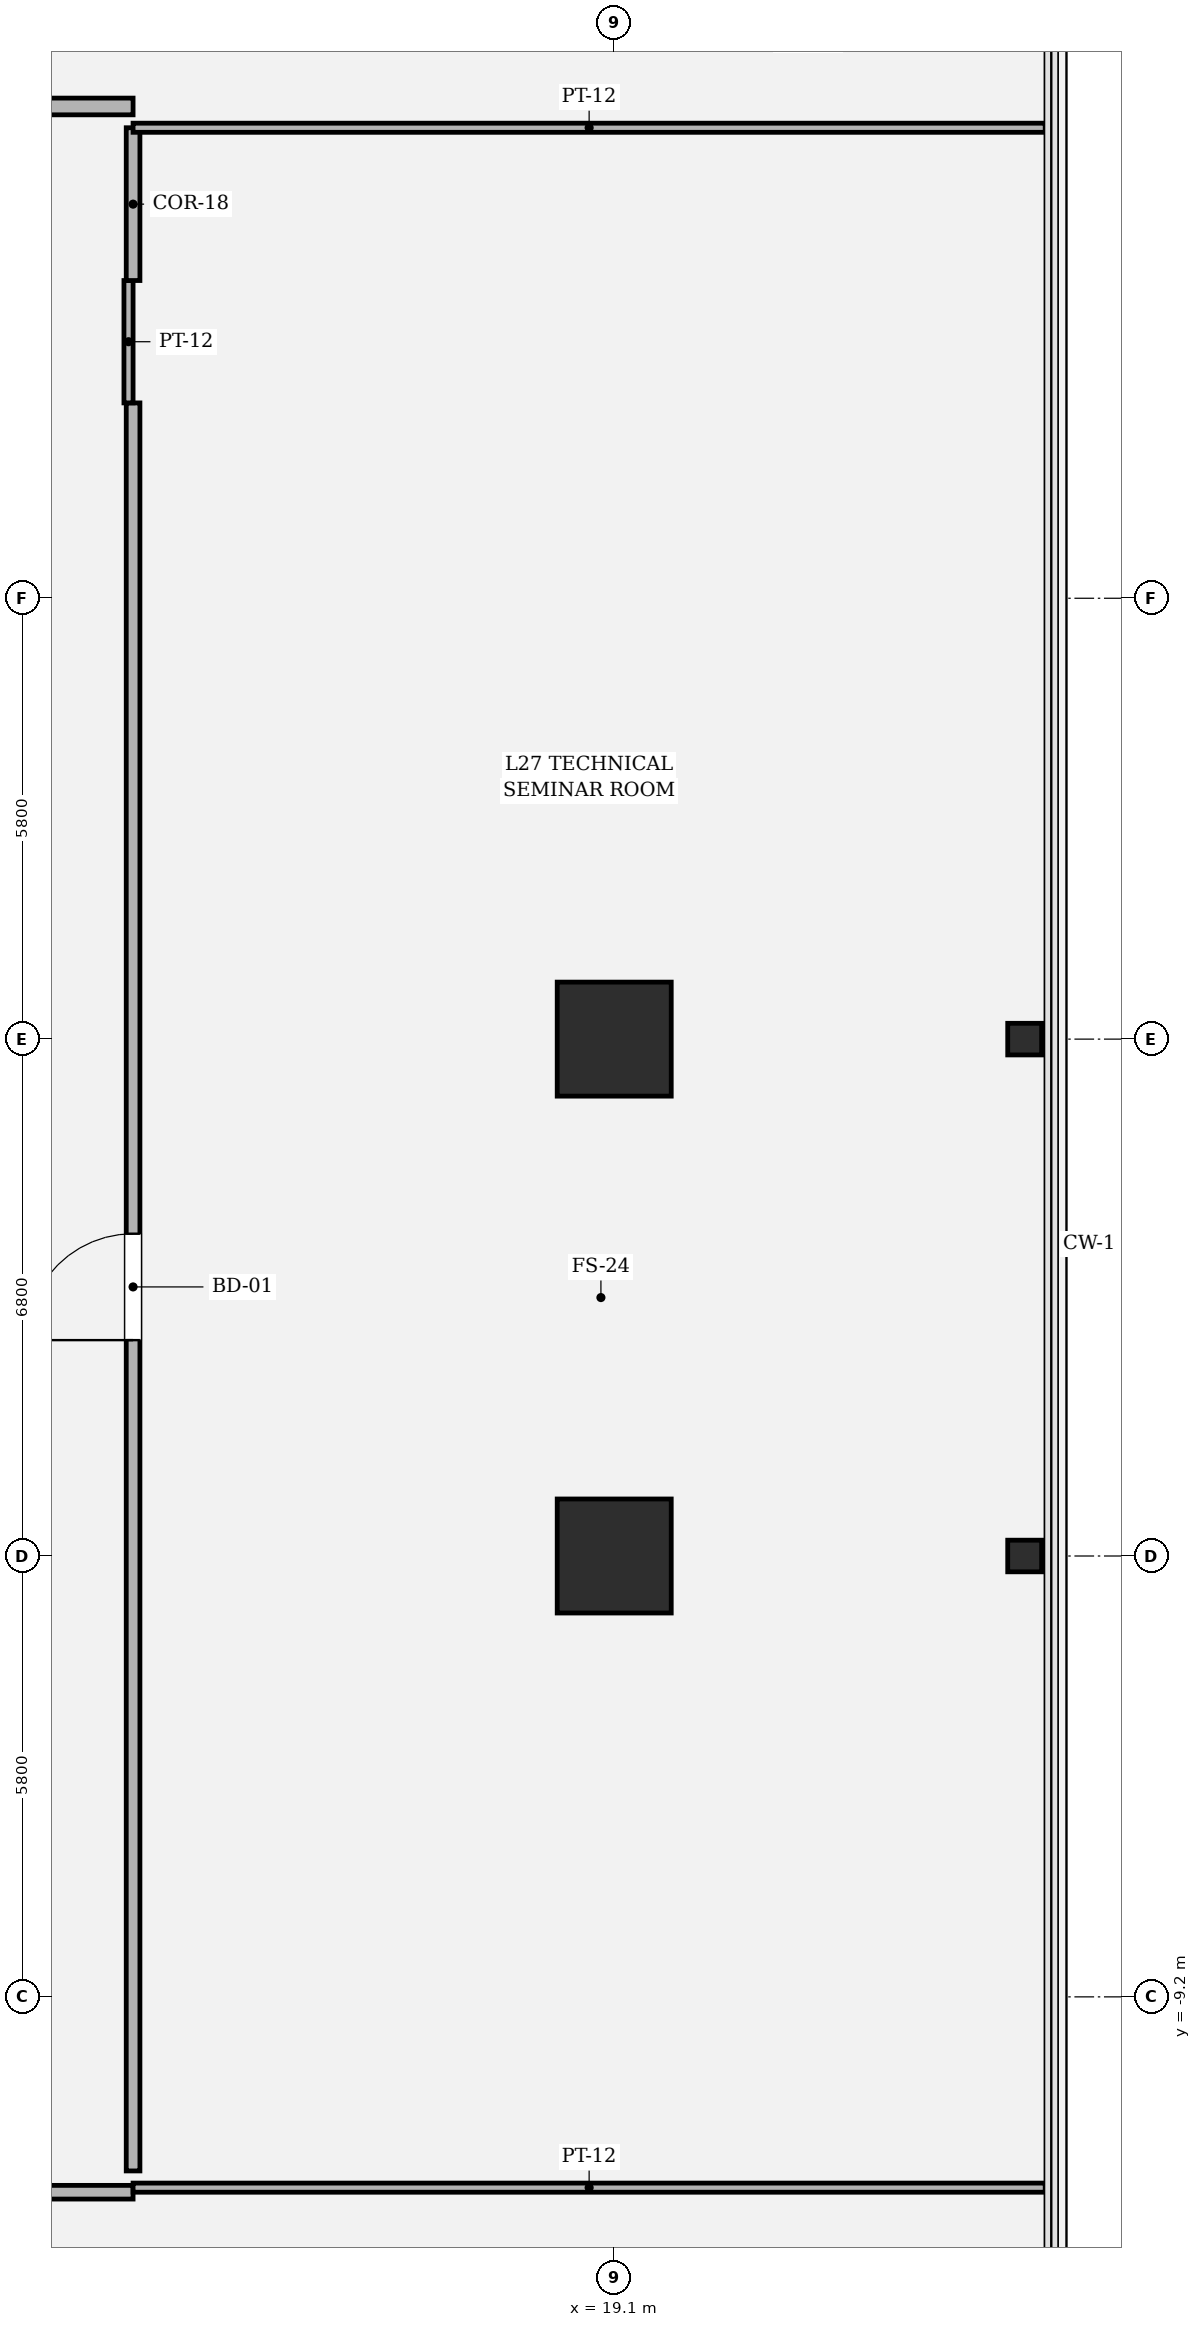
"""IFC4 building model, lengths in metres.
Left out: names, types, materials, properties, quantities, classifications, styles, units other than length and angle.
Written with IfcOpenShell. Run it as: python <this file> out.ifc"""

import sys

from ifc_helpers import new_model, si_unit, direction, frame, frame_2d, origin, origin_2d, place, context, subcontext, project, spatial, rectangle, hollow_rectangle, i_section, extrude, element, fill, save


model = new_model("IFC4")
c1 = context("Model", 3, precision=1e-05, world=origin(), true_north=direction((0.0, 1.0)))
c2 = subcontext(c1, "Body", "Model", "MODEL_VIEW")
j1 = project(units=[si_unit("LENGTHUNIT", "METRE"), si_unit("PLANEANGLEUNIT", "RADIAN")], contexts=[c1])
p1 = place(None, origin())
s1 = spatial("IfcSite", under=j1, at=p1, CompositionType="ELEMENT")
p2 = place(p1, origin())
s2 = spatial("IfcBuilding", under=s1, at=p2, CompositionType="ELEMENT")
p3 = place(p2, frame((0.0, 0.0, 117.3)))
s3 = spatial("IfcBuildingStorey", under=s2, at=p3, CompositionType="ELEMENT", Elevation=117.3)
for number, where, z_axis, x_axis in (
    (1, (19.1, -3.4, 0.0), (0.0, 0.0, 1.0), (1.0, 0.0, 0.0)),
    (2, (19.1, 3.4, 0.0), (0.0, 0.0, 1.0), (1.0, 0.0, 0.0)),
):
    element("IfcColumn", number, at=place(p3, frame(where, z_axis=z_axis, x_axis=x_axis)), inside=s3, PredefinedType="COLUMN", context=c2, shape_type="SweptSolid", body=[
        extrude(hollow_rectangle(XDim=1.5, YDim=1.5, WallThickness=0.045, at=origin_2d()), origin(), (0.0, 0.0, 1.0), 4.05),
    ])
for number, where, z_axis, x_axis in (
    (3, (24.5, -3.4, 0.0), (0.0, 0.0, 1.0), (0.0, 1.0, 0.0)),
    (4, (24.5, 3.4, 0.0), (0.0, 0.0, 1.0), (0.0, 1.0, 0.0)),
):
    element("IfcColumn", number, at=place(p3, frame(where, z_axis=z_axis, x_axis=x_axis)), inside=s3, PredefinedType="COLUMN", context=c2, shape_type="SweptSolid", body=[
        extrude(i_section(OverallWidth=0.416, OverallDepth=0.446, WebThickness=0.039, FlangeThickness=0.062, FilletRadius=0.018, at=origin_2d()), origin(), (0.0, 0.0, 1.0), 4.048),
    ])
p4 = place(p3, frame((1.2, -11.77, 0.0), z_axis=(0.0, 0.0, 1.0), x_axis=(1.0, 0.0, 0.0)))
e5 = element("IfcWall", 5, at=p4, inside=s3, PredefinedType="PARTITIONING", context=c2, shape_type="SweptSolid", body=[
    extrude(rectangle(XDim=11.57, YDim=0.18, at=frame_2d((5.785, 0.0))), origin(), (0.0, 0.0, 1.0), 3.104),
])
p5 = place(p4, frame((5.26, 0.0, 0.0)))
e6 = element("IfcOpeningElement", 6, at=p5, cuts=e5, PredefinedType="OPENING", context=c2, shape_type="SweptSolid", body=[
    extrude(rectangle(XDim=1.05, YDim=2.2, at=frame_2d((0.525, 1.1))), frame((0.0, 0.1, 0.0), z_axis=(0.0, -1.0, 0.0), x_axis=(1.0, 0.0, 0.0)), (0.0, 0.0, 1.0), 0.2),
])
p6 = place(p3, frame((12.77, -11.71, 0.0), z_axis=(0.0, 0.0, 1.0), x_axis=(1.0, 0.0, 0.0)))
e7 = element("IfcWall", 7, at=p6, inside=s3, PredefinedType="PARTITIONING", context=c2, shape_type="SweptSolid", body=[
    extrude(rectangle(XDim=12.0, YDim=0.12, at=frame_2d((6.0, 0.0))), origin(), (0.0, 0.0, 1.0), 2.524),
])
p7 = place(p3, frame((12.77, -11.49, 0.0), z_axis=(0.0, 0.0, 1.0), x_axis=(0.0, 1.0, 0.0)))
e8 = element("IfcWall", 8, at=p7, inside=s3, PredefinedType="PARTITIONING", context=c2, shape_type="SweptSolid", body=[
    extrude(rectangle(XDim=23.26, YDim=0.18, at=frame_2d((11.63, 0.0))), origin(), (0.0, 0.0, 1.0), 3.104),
])
p8 = place(p7, frame((10.93, 0.0, 0.0)))
e9 = element("IfcOpeningElement", 9, at=p8, cuts=e8, PredefinedType="OPENING", context=c2, shape_type="SweptSolid", body=[
    extrude(rectangle(XDim=1.4, YDim=2.25, at=frame_2d((0.7, 1.125))), frame((0.0, 0.1, 0.0), z_axis=(0.0, -1.0, 0.0), x_axis=(1.0, 0.0, 0.0)), (0.0, 0.0, 1.0), 0.2),
])
p9 = place(p3, frame((12.71, 11.77, 0.0), z_axis=(0.0, 0.0, 1.0), x_axis=(0.0, 1.0, 0.0)))
e10 = element("IfcWall", 10, at=p9, inside=s3, PredefinedType="PARTITIONING", context=c2, shape_type="SweptSolid", body=[
    extrude(rectangle(XDim=1.61, YDim=0.12, at=frame_2d((0.805, 0.0))), origin(), (0.0, 0.0, 1.0), 3.354),
])
p10 = place(p3, frame((12.77, 13.38, 0.0), z_axis=(0.0, 0.0, 1.0), x_axis=(0.0, 1.0, 0.0)))
e11 = element("IfcWall", 11, at=p10, inside=s3, PredefinedType="PARTITIONING", context=c2, shape_type="SweptSolid", body=[
    extrude(rectangle(XDim=2.01, YDim=0.18, at=frame_2d((1.005, 0.0))), origin(), (0.0, 0.0, 1.0), 3.354),
])
p11 = place(p3, frame((12.77, 15.39, 0.0), z_axis=(0.0, 0.0, 1.0), x_axis=(1.0, 0.0, 0.0)))
e12 = element("IfcWall", 12, at=p11, inside=s3, PredefinedType="PARTITIONING", context=c2, shape_type="SweptSolid", body=[
    extrude(rectangle(XDim=12.0, YDim=0.12, at=frame_2d((6.0, 0.0))), origin(), (0.0, 0.0, 1.0), 3.104),
])
p12 = place(p3, frame((12.77, 15.67, 0.0), z_axis=(0.0, 0.0, 1.0), x_axis=(-1.0, 0.0, 0.0)))
e13 = element("IfcWall", 13, at=p12, inside=s3, PredefinedType="SOLIDWALL", context=c2, shape_type="SweptSolid", body=[
    extrude(rectangle(XDim=10.31, YDim=0.22, at=frame_2d((5.155, 0.0))), origin(), (0.0, 0.0, 1.0), 3.104),
])
p13 = place(p12, frame((4.605, 0.0, 0.0)))
e14 = element("IfcOpeningElement", 14, at=p13, cuts=e13, PredefinedType="OPENING", context=c2, shape_type="SweptSolid", body=[
    extrude(rectangle(XDim=1.1, YDim=2.2, at=frame_2d((0.55, 1.1))), frame((0.0, 0.12, 0.0), z_axis=(0.0, -1.0, 0.0), x_axis=(1.0, 0.0, 0.0)), (0.0, 0.0, 1.0), 0.24),
])
p14 = place(p8, origin())
e15 = element("IfcDoor", 15, at=p14, inside=s3, OperationType="SINGLE_SWING_LEFT", PredefinedType="DOOR", context=c2, shape_type="SweptSolid", body=[
    extrude(rectangle(XDim=1.4, YDim=2.25, at=frame_2d((0.7, 1.125))), frame((0.0, 0.025, 0.0), z_axis=(0.0, -1.0, 0.0), x_axis=(1.0, 0.0, 0.0)), (0.0, 0.0, 1.0), 0.05),
])
fill(e9, e15)
save(model, sys.argv[1])
